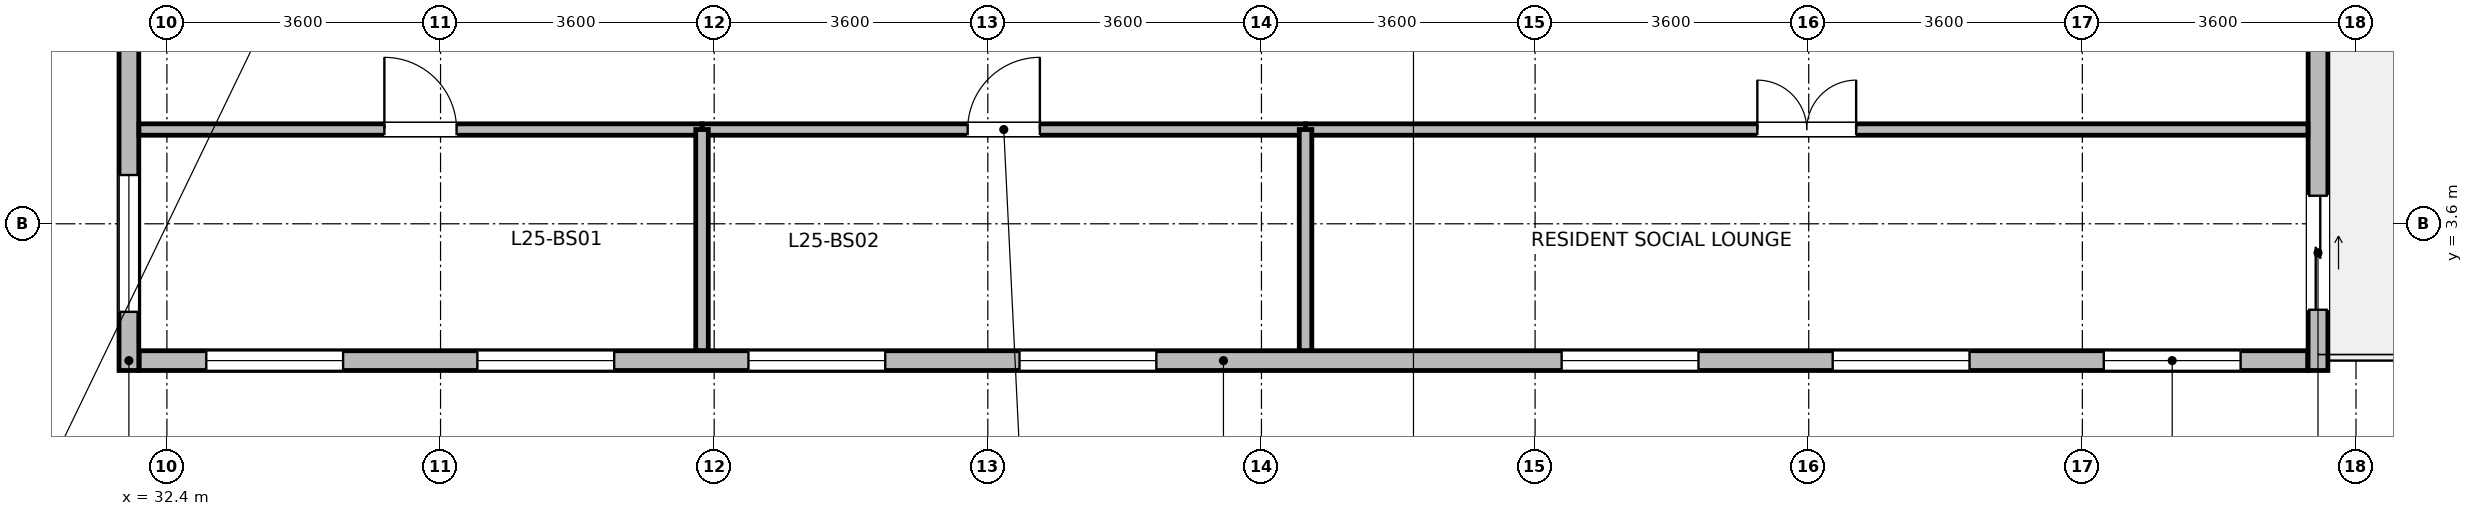
"""IFC4 building model, lengths in metres.
Left out: names, types, materials, properties, quantities, classifications, styles, units other than length and angle.
Written with IfcOpenShell. Run it as: python <this file> out.ifc"""

import sys

from ifc_helpers import new_model, si_unit, direction, frame, frame_2d, origin, place, context, subcontext, project, spatial, rectangle, extrude, element, fill, save


model = new_model("IFC4")
c1 = context("Model", 3, precision=1e-05, world=origin(), true_north=direction((0.0, 1.0)))
c2 = subcontext(c1, "Body", "Model", "MODEL_VIEW")
j1 = project(units=[si_unit("LENGTHUNIT", "METRE"), si_unit("PLANEANGLEUNIT", "RADIAN")], contexts=[c1])
p1 = place(None, origin())
s1 = spatial("IfcSite", under=j1, at=p1, CompositionType="ELEMENT")
p2 = place(p1, origin())
s2 = spatial("IfcBuilding", under=s1, at=p2, CompositionType="ELEMENT")
p3 = place(p2, frame((0.0, 0.0, 100.8)))
s3 = spatial("IfcBuildingStorey", under=s2, at=p3, CompositionType="ELEMENT", Elevation=100.8)
p4 = place(p3, frame((60.565, 1.8, 0.0), z_axis=(0.0, 0.0, 1.0), x_axis=(-1.0, 0.0, 0.0)))
e1 = element("IfcWall", 1, at=p4, inside=s3, PredefinedType="STANDARD", context=c2, shape_type="SweptSolid", body=[
    extrude(rectangle(XDim=28.53, YDim=0.26, at=frame_2d((14.265, 0.0))), origin(), (0.0, 0.0, 1.0), 3.43),
])
p5 = place(p4, frame((0.883, 0.0, 0.85)))
e2 = element("IfcOpeningElement", 2, at=p5, cuts=e1, PredefinedType="OPENING", context=c2, shape_type="SweptSolid", body=[
    extrude(rectangle(XDim=1.8, YDim=1.85, at=frame_2d((0.9, 0.925))), frame((0.0, 0.14, 0.0), z_axis=(0.0, -1.0, 0.0), x_axis=(1.0, 0.0, 0.0)), (0.0, 0.0, 1.0), 0.28),
])
p6 = place(p4, frame((4.449, 0.0, 0.85)))
e3 = element("IfcOpeningElement", 3, at=p6, cuts=e1, PredefinedType="OPENING", context=c2, shape_type="SweptSolid", body=[
    extrude(rectangle(XDim=1.8, YDim=1.85, at=frame_2d((0.9, 0.925))), frame((0.0, 0.14, 0.0), z_axis=(0.0, -1.0, 0.0), x_axis=(1.0, 0.0, 0.0)), (0.0, 0.0, 1.0), 0.28),
])
p7 = place(p4, frame((8.016, 0.0, 0.85)))
e4 = element("IfcOpeningElement", 4, at=p7, cuts=e1, PredefinedType="OPENING", context=c2, shape_type="SweptSolid", body=[
    extrude(rectangle(XDim=1.8, YDim=1.85, at=frame_2d((0.9, 0.925))), frame((0.0, 0.14, 0.0), z_axis=(0.0, -1.0, 0.0), x_axis=(1.0, 0.0, 0.0)), (0.0, 0.0, 1.0), 0.28),
])
p8 = place(p4, frame((15.148, 0.0, 0.85)))
e5 = element("IfcOpeningElement", 5, at=p8, cuts=e1, PredefinedType="OPENING", context=c2, shape_type="SweptSolid", body=[
    extrude(rectangle(XDim=1.8, YDim=1.85, at=frame_2d((0.9, 0.925))), frame((0.0, 0.14, 0.0), z_axis=(0.0, -1.0, 0.0), x_axis=(1.0, 0.0, 0.0)), (0.0, 0.0, 1.0), 0.28),
])
p9 = place(p4, frame((18.714, 0.0, 0.85)))
e6 = element("IfcOpeningElement", 6, at=p9, cuts=e1, PredefinedType="OPENING", context=c2, shape_type="SweptSolid", body=[
    extrude(rectangle(XDim=1.8, YDim=1.85, at=frame_2d((0.9, 0.925))), frame((0.0, 0.14, 0.0), z_axis=(0.0, -1.0, 0.0), x_axis=(1.0, 0.0, 0.0)), (0.0, 0.0, 1.0), 0.28),
])
p10 = place(p4, frame((22.281, 0.0, 0.85)))
e7 = element("IfcOpeningElement", 7, at=p10, cuts=e1, PredefinedType="OPENING", context=c2, shape_type="SweptSolid", body=[
    extrude(rectangle(XDim=1.8, YDim=1.85, at=frame_2d((0.9, 0.925))), frame((0.0, 0.14, 0.0), z_axis=(0.0, -1.0, 0.0), x_axis=(1.0, 0.0, 0.0)), (0.0, 0.0, 1.0), 0.28),
])
p11 = place(p4, frame((25.847, 0.0, 0.85)))
e8 = element("IfcOpeningElement", 8, at=p11, cuts=e1, PredefinedType="OPENING", context=c2, shape_type="SweptSolid", body=[
    extrude(rectangle(XDim=1.8, YDim=1.85, at=frame_2d((0.9, 0.925))), frame((0.0, 0.14, 0.0), z_axis=(0.0, -1.0, 0.0), x_axis=(1.0, 0.0, 0.0)), (0.0, 0.0, 1.0), 0.28),
])
p12 = place(p3, frame((60.7, 6.834, 0.0), z_axis=(0.0, 0.0, 1.0), x_axis=(0.0, -1.0, 0.0)))
e9 = element("IfcWall", 9, at=p12, inside=s3, PredefinedType="STANDARD", context=c2, shape_type="SweptSolid", body=[
    extrude(rectangle(XDim=5.164, YDim=0.26, at=frame_2d((2.582, 0.0))), origin(), (0.0, 0.0, 1.0), 3.43),
])
p13 = place(p12, frame((2.865, 0.0, 0.0)))
e10 = element("IfcOpeningElement", 10, at=p13, cuts=e9, PredefinedType="OPENING", context=c2, shape_type="SweptSolid", body=[
    extrude(rectangle(XDim=1.5, YDim=2.15, at=frame_2d((0.75, 1.075))), frame((0.0, 0.14, 0.0), z_axis=(0.0, -1.0, 0.0), x_axis=(1.0, 0.0, 0.0)), (0.0, 0.0, 1.0), 0.28),
])
p14 = place(p3, frame((31.9, 1.67, 0.0), z_axis=(0.0, 0.0, 1.0), x_axis=(0.0, 1.0, 0.0)))
e11 = element("IfcWall", 11, at=p14, inside=s3, PredefinedType="STANDARD", context=c2, shape_type="SweptSolid", body=[
    extrude(rectangle(XDim=20.06, YDim=0.26, at=frame_2d((10.03, 0.0))), origin(), (0.0, 0.0, 1.0), 3.43),
])
p15 = place(p14, frame((0.772, 0.0, 0.85)))
e12 = element("IfcOpeningElement", 12, at=p15, cuts=e11, PredefinedType="OPENING", context=c2, shape_type="SweptSolid", body=[
    extrude(rectangle(XDim=1.8, YDim=1.85, at=frame_2d((0.9, 0.925))), frame((0.0, 0.14, 0.0), z_axis=(0.0, -1.0, 0.0), x_axis=(1.0, 0.0, 0.0)), (0.0, 0.0, 1.0), 0.28),
])
p16 = place(p14, frame((7.458, 0.0, 0.85)))
e13 = element("IfcOpeningElement", 13, at=p16, cuts=e11, PredefinedType="OPENING", context=c2, shape_type="SweptSolid", body=[
    extrude(rectangle(XDim=1.8, YDim=1.85, at=frame_2d((0.9, 0.925))), frame((0.0, 0.14, 0.0), z_axis=(0.0, -1.0, 0.0), x_axis=(1.0, 0.0, 0.0)), (0.0, 0.0, 1.0), 0.28),
])
p17 = place(p14, frame((14.145, 0.0, 0.85)))
e14 = element("IfcOpeningElement", 14, at=p17, cuts=e11, PredefinedType="OPENING", context=c2, shape_type="SweptSolid", body=[
    extrude(rectangle(XDim=1.8, YDim=1.85, at=frame_2d((0.9, 0.925))), frame((0.0, 0.14, 0.0), z_axis=(0.0, -1.0, 0.0), x_axis=(1.0, 0.0, 0.0)), (0.0, 0.0, 1.0), 0.28),
])
p18 = place(p14, frame((17.488, 0.0, 0.85)))
e15 = element("IfcOpeningElement", 15, at=p18, cuts=e11, PredefinedType="OPENING", context=c2, shape_type="SweptSolid", body=[
    extrude(rectangle(XDim=1.8, YDim=1.85, at=frame_2d((0.9, 0.925))), frame((0.0, 0.14, 0.0), z_axis=(0.0, -1.0, 0.0), x_axis=(1.0, 0.0, 0.0)), (0.0, 0.0, 1.0), 0.28),
])
p19 = place(p3, frame((47.38, 4.84, 0.0), z_axis=(0.0, 0.0, 1.0), x_axis=(1.0, 0.0, 0.0)))
e16 = element("IfcWall", 16, at=p19, inside=s3, PredefinedType="PARTITIONING", context=c2, shape_type="SweptSolid", body=[
    extrude(rectangle(XDim=13.188, YDim=0.15, at=frame_2d((6.594, 0.0))), origin(), (0.0, 0.0, 1.0), 3.43),
])
p20 = place(p19, frame((5.944, 0.0, 0.0)))
e17 = element("IfcOpeningElement", 17, at=p20, cuts=e16, PredefinedType="OPENING", context=c2, shape_type="SweptSolid", body=[
    extrude(rectangle(XDim=1.3, YDim=2.12, at=frame_2d((0.65, 1.06))), frame((0.0, 0.085, 0.0), z_axis=(0.0, -1.0, 0.0), x_axis=(1.0, 0.0, 0.0)), (0.0, 0.0, 1.0), 0.17),
])
p21 = place(p3, frame((39.44, 4.84, 0.0), z_axis=(0.0, 0.0, 1.0), x_axis=(1.0, 0.0, 0.0)))
e18 = element("IfcWall", 18, at=p21, inside=s3, PredefinedType="PARTITIONING", context=c2, shape_type="SweptSolid", body=[
    extrude(rectangle(XDim=7.94, YDim=0.15, at=frame_2d((3.97, 0.0))), origin(), (0.0, 0.0, 1.0), 3.43),
])
p22 = place(p21, frame((3.495, 0.0, 0.0)))
e19 = element("IfcOpeningElement", 19, at=p22, cuts=e18, PredefinedType="OPENING", context=c2, shape_type="SweptSolid", body=[
    extrude(rectangle(XDim=0.95, YDim=2.1, at=frame_2d((0.475, 1.05))), frame((0.0, 0.085, 0.0), z_axis=(0.0, -1.0, 0.0), x_axis=(1.0, 0.0, 0.0)), (0.0, 0.0, 1.0), 0.17),
])
p23 = place(p3, frame((32.032, 4.84, 0.0), z_axis=(0.0, 0.0, 1.0), x_axis=(1.0, 0.0, 0.0)))
e20 = element("IfcWall", 20, at=p23, inside=s3, PredefinedType="PARTITIONING", context=c2, shape_type="SweptSolid", body=[
    extrude(rectangle(XDim=7.408, YDim=0.15, at=frame_2d((3.704, 0.0))), origin(), (0.0, 0.0, 1.0), 3.43),
])
p24 = place(p23, frame((3.229, 0.0, 0.0)))
e21 = element("IfcOpeningElement", 21, at=p24, cuts=e20, PredefinedType="OPENING", context=c2, shape_type="SweptSolid", body=[
    extrude(rectangle(XDim=0.95, YDim=2.1, at=frame_2d((0.475, 1.05))), frame((0.0, 0.085, 0.0), z_axis=(0.0, -1.0, 0.0), x_axis=(1.0, 0.0, 0.0)), (0.0, 0.0, 1.0), 0.17),
])
for number, where, z_axis, x_axis in (
    (22, (39.44, 1.932, 0.0), (0.0, 0.0, 1.0), (0.0, 1.0, 0.0)),
    (23, (47.38, 1.932, 0.0), (0.0, 0.0, 1.0), (0.0, 1.0, 0.0)),
):
    element("IfcWall", number, at=place(p3, frame(where, z_axis=z_axis, x_axis=x_axis)), inside=s3, PredefinedType="PARTITIONING", context=c2, shape_type="SweptSolid", body=[
        extrude(rectangle(XDim=2.908, YDim=0.165, at=frame_2d((1.454, 0.0))), origin(), (0.0, 0.0, 1.0), 3.43),
    ])
p25 = place(p5, origin())
e24 = element("IfcWindow", 24, at=p25, inside=s3, PartitioningType="SINGLE_PANEL", PredefinedType="WINDOW", context=c2, shape_type="SweptSolid", body=[
    extrude(rectangle(XDim=1.8, YDim=1.85, at=frame_2d((0.9, 0.925))), frame((0.0, 0.03, 0.0), z_axis=(0.0, -1.0, 0.0), x_axis=(1.0, 0.0, 0.0)), (0.0, 0.0, 1.0), 0.06),
])
fill(e2, e24)
p26 = place(p6, origin())
e25 = element("IfcWindow", 25, at=p26, inside=s3, PartitioningType="SINGLE_PANEL", PredefinedType="WINDOW", context=c2, shape_type="SweptSolid", body=[
    extrude(rectangle(XDim=1.8, YDim=1.85, at=frame_2d((0.9, 0.925))), frame((0.0, 0.03, 0.0), z_axis=(0.0, -1.0, 0.0), x_axis=(1.0, 0.0, 0.0)), (0.0, 0.0, 1.0), 0.06),
])
fill(e3, e25)
p27 = place(p7, origin())
e26 = element("IfcWindow", 26, at=p27, inside=s3, PartitioningType="SINGLE_PANEL", PredefinedType="WINDOW", context=c2, shape_type="SweptSolid", body=[
    extrude(rectangle(XDim=1.8, YDim=1.85, at=frame_2d((0.9, 0.925))), frame((0.0, 0.03, 0.0), z_axis=(0.0, -1.0, 0.0), x_axis=(1.0, 0.0, 0.0)), (0.0, 0.0, 1.0), 0.06),
])
fill(e4, e26)
p28 = place(p8, origin())
e27 = element("IfcWindow", 27, at=p28, inside=s3, PartitioningType="SINGLE_PANEL", PredefinedType="WINDOW", context=c2, shape_type="SweptSolid", body=[
    extrude(rectangle(XDim=1.8, YDim=1.85, at=frame_2d((0.9, 0.925))), frame((0.0, 0.03, 0.0), z_axis=(0.0, -1.0, 0.0), x_axis=(1.0, 0.0, 0.0)), (0.0, 0.0, 1.0), 0.06),
])
fill(e5, e27)
p29 = place(p9, origin())
e28 = element("IfcWindow", 28, at=p29, inside=s3, PartitioningType="SINGLE_PANEL", PredefinedType="WINDOW", context=c2, shape_type="SweptSolid", body=[
    extrude(rectangle(XDim=1.8, YDim=1.85, at=frame_2d((0.9, 0.925))), frame((0.0, 0.03, 0.0), z_axis=(0.0, -1.0, 0.0), x_axis=(1.0, 0.0, 0.0)), (0.0, 0.0, 1.0), 0.06),
])
fill(e6, e28)
p30 = place(p10, origin())
e29 = element("IfcWindow", 29, at=p30, inside=s3, PartitioningType="SINGLE_PANEL", PredefinedType="WINDOW", context=c2, shape_type="SweptSolid", body=[
    extrude(rectangle(XDim=1.8, YDim=1.85, at=frame_2d((0.9, 0.925))), frame((0.0, 0.03, 0.0), z_axis=(0.0, -1.0, 0.0), x_axis=(1.0, 0.0, 0.0)), (0.0, 0.0, 1.0), 0.06),
])
fill(e7, e29)
p31 = place(p11, origin())
e30 = element("IfcWindow", 30, at=p31, inside=s3, PartitioningType="SINGLE_PANEL", PredefinedType="WINDOW", context=c2, shape_type="SweptSolid", body=[
    extrude(rectangle(XDim=1.8, YDim=1.85, at=frame_2d((0.9, 0.925))), frame((0.0, 0.03, 0.0), z_axis=(0.0, -1.0, 0.0), x_axis=(1.0, 0.0, 0.0)), (0.0, 0.0, 1.0), 0.06),
])
fill(e8, e30)
p32 = place(p13, origin())
e31 = element("IfcDoor", 31, at=p32, inside=s3, OperationType="SLIDING_TO_LEFT", PredefinedType="DOOR", context=c2, shape_type="SweptSolid", body=[
    extrude(rectangle(XDim=1.5, YDim=2.15, at=frame_2d((0.75, 1.075))), frame((0.0, 0.025, 0.0), z_axis=(0.0, -1.0, 0.0), x_axis=(1.0, 0.0, 0.0)), (0.0, 0.0, 1.0), 0.05),
])
fill(e10, e31)
p33 = place(p15, origin())
e32 = element("IfcWindow", 32, at=p33, inside=s3, PartitioningType="SINGLE_PANEL", PredefinedType="WINDOW", context=c2, shape_type="SweptSolid", body=[
    extrude(rectangle(XDim=1.8, YDim=1.85, at=frame_2d((0.9, 0.925))), frame((0.0, 0.03, 0.0), z_axis=(0.0, -1.0, 0.0), x_axis=(1.0, 0.0, 0.0)), (0.0, 0.0, 1.0), 0.06),
])
fill(e12, e32)
p34 = place(p20, origin())
e33 = element("IfcDoor", 33, at=p34, inside=s3, OperationType="DOUBLE_DOOR_SINGLE_SWING", PredefinedType="DOOR", context=c2, shape_type="SweptSolid", body=[
    extrude(rectangle(XDim=1.3, YDim=2.12, at=frame_2d((0.65, 1.06))), frame((0.0, 0.025, 0.0), z_axis=(0.0, -1.0, 0.0), x_axis=(1.0, 0.0, 0.0)), (0.0, 0.0, 1.0), 0.05),
])
fill(e17, e33)
p35 = place(p22, origin())
e34 = element("IfcDoor", 34, at=p35, inside=s3, OperationType="SINGLE_SWING_RIGHT", PredefinedType="DOOR", context=c2, shape_type="SweptSolid", body=[
    extrude(rectangle(XDim=0.95, YDim=2.1, at=frame_2d((0.475, 1.05))), frame((0.0, 0.025, 0.0), z_axis=(0.0, -1.0, 0.0), x_axis=(1.0, 0.0, 0.0)), (0.0, 0.0, 1.0), 0.05),
])
fill(e19, e34)
p36 = place(p24, origin())
e35 = element("IfcDoor", 35, at=p36, inside=s3, OperationType="SINGLE_SWING_LEFT", PredefinedType="DOOR", context=c2, shape_type="SweptSolid", body=[
    extrude(rectangle(XDim=0.95, YDim=2.1, at=frame_2d((0.475, 1.05))), frame((0.0, 0.025, 0.0), z_axis=(0.0, -1.0, 0.0), x_axis=(1.0, 0.0, 0.0)), (0.0, 0.0, 1.0), 0.05),
])
fill(e21, e35)
save(model, sys.argv[1])
